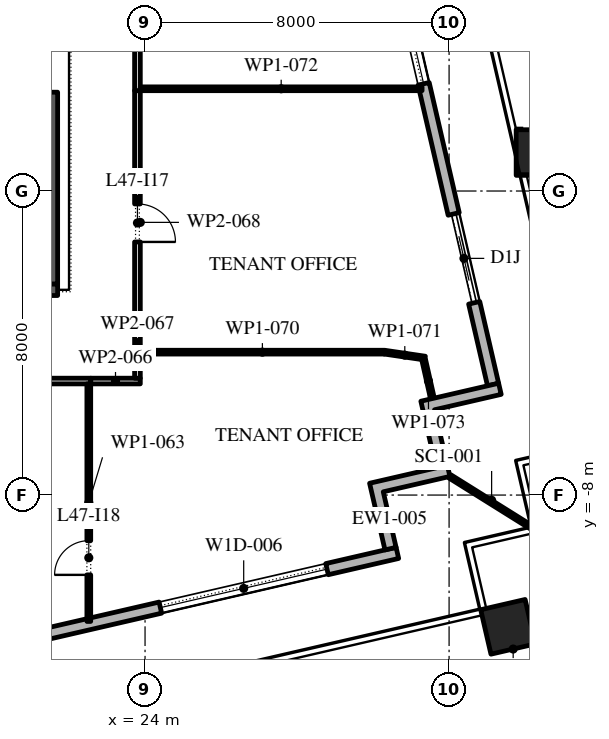
"""IFC4 building model, lengths in metres.
Left out: names, types, materials, properties, quantities, classifications, styles, units other than length and angle.
Written with IfcOpenShell. Run it as: python <this file> out.ifc"""

import sys

from ifc_helpers import new_model, si_unit, direction, frame, frame_2d, origin, origin_2d, place, context, subcontext, project, spatial, polyline, rectangle, outline, extrude, element, fill, save


model = new_model("IFC4")
c1 = context("Model", 3, precision=1e-05, world=origin(), true_north=direction((0.0, 1.0)))
c2 = subcontext(c1, "Body", "Model", "MODEL_VIEW")
j1 = project(units=[si_unit("LENGTHUNIT", "METRE"), si_unit("PLANEANGLEUNIT", "RADIAN")], contexts=[c1])
p1 = place(None, origin())
s1 = spatial("IfcSite", under=j1, at=p1, CompositionType="ELEMENT")
p2 = place(p1, origin())
s2 = spatial("IfcBuilding", under=s1, at=p2, CompositionType="ELEMENT")
p3 = place(p2, frame((0.0, 0.0, 213.6)))
s3 = spatial("IfcBuildingStorey", under=s2, at=p3, CompositionType="ELEMENT", Elevation=213.6)
p4 = place(p3, frame((33.551, -11.467, 0.0), z_axis=(0.0, 0.0, 1.0), x_axis=(0.974370064785, 0.224951054344, 0.0)))
e1 = element("IfcColumn", 1, at=p4, inside=s3, PredefinedType="COLUMN", context=c2, shape_type="SweptSolid", body=[
    extrude(rectangle(XDim=1.2, YDim=1.2, at=origin_2d()), origin(), (0.0, 0.0, 1.0), 4.2),
])
p5 = place(p3, frame((34.365, 1.012, 0.0), z_axis=(-0.002731884952, 0.01168316756, 0.999928017609), x_axis=(-0.973733900744, -0.227689021567, 0.0)))
e2 = element("IfcColumn", 2, at=p5, inside=s3, PredefinedType="COLUMN", context=c2, shape_type="SweptSolid", body=[
    extrude(rectangle(XDim=1.2, YDim=1.2, at=origin_2d()), origin(), (0.0, 0.0, 1.0), 4.2),
])
p6 = place(p3, frame((-17.592, -20.657, 0.0), z_axis=(0.0, 0.0, 1.0), x_axis=(0.974370243697, 0.224950279389, 0.0)))
e3 = element("IfcWall", 3, at=p6, inside=s3, PredefinedType="STANDARD", context=c2, shape_type="SweptSolid", body=[
    extrude(rectangle(XDim=49.5, YDim=0.3, at=frame_2d((24.75, 0.0))), origin(), (0.0, 0.0, 1.0), 4.0),
])
p7 = place(p6, frame((2.8, 0.0, 0.0)))
e4 = element("IfcOpeningElement", 4, at=p7, cuts=e3, PredefinedType="OPENING", context=c2, shape_type="SweptSolid", body=[
    extrude(rectangle(XDim=2.4, YDim=3.5, at=frame_2d((1.2, 1.75))), frame((0.0, 0.16, 0.0), z_axis=(0.0, -1.0, 0.0), x_axis=(1.0, 0.0, 0.0)), (0.0, 0.0, 1.0), 0.32),
])
p8 = place(p6, frame((9.9, 0.0, 0.45)))
e5 = element("IfcOpeningElement", 5, at=p8, cuts=e3, PredefinedType="OPENING", context=c2, shape_type="SweptSolid", body=[
    extrude(rectangle(XDim=4.5, YDim=2.575, at=frame_2d((2.25, 1.288))), frame((0.0, 0.16, 0.0), z_axis=(0.0, -1.0, 0.0), x_axis=(1.0, 0.0, 0.0)), (0.0, 0.0, 1.0), 0.32),
])
p9 = place(p6, frame((18.2, 0.0, 0.45)))
e6 = element("IfcOpeningElement", 6, at=p9, cuts=e3, PredefinedType="OPENING", context=c2, shape_type="SweptSolid", body=[
    extrude(rectangle(XDim=4.5, YDim=2.675, at=frame_2d((2.25, 1.337))), frame((0.0, 0.16, 0.0), z_axis=(0.0, -1.0, 0.0), x_axis=(1.0, 0.0, 0.0)), (0.0, 0.0, 1.0), 0.32),
])
p10 = place(p6, frame((26.5, 0.0, 0.45)))
e7 = element("IfcOpeningElement", 7, at=p10, cuts=e3, PredefinedType="OPENING", context=c2, shape_type="SweptSolid", body=[
    extrude(rectangle(XDim=4.5, YDim=2.75, at=frame_2d((2.25, 1.375))), frame((0.0, 0.16, 0.0), z_axis=(0.0, -1.0, 0.0), x_axis=(1.0, 0.0, 0.0)), (0.0, 0.0, 1.0), 0.32),
])
p11 = place(p6, frame((36.8, 0.0, 0.0)))
e8 = element("IfcOpeningElement", 8, at=p11, cuts=e3, PredefinedType="OPENING", context=c2, shape_type="SweptSolid", body=[
    extrude(rectangle(XDim=2.4, YDim=3.275, at=frame_2d((1.2, 1.637))), frame((0.0, 0.16, 0.0), z_axis=(0.0, -1.0, 0.0), x_axis=(1.0, 0.0, 0.0)), (0.0, 0.0, 1.0), 0.32),
])
p12 = place(p6, frame((43.1, 0.0, 0.45)))
e9 = element("IfcOpeningElement", 9, at=p12, cuts=e3, PredefinedType="OPENING", context=c2, shape_type="SweptSolid", body=[
    extrude(rectangle(XDim=4.5, YDim=2.875, at=frame_2d((2.25, 1.438))), frame((0.0, 0.16, 0.0), z_axis=(0.0, -1.0, 0.0), x_axis=(1.0, 0.0, 0.0)), (0.0, 0.0, 1.0), 0.32),
])
p13 = place(p3, frame((33.157, -5.092, 0.0), z_axis=(0.0, 0.0, 1.0), x_axis=(-0.224950279389, 0.974370243697, 0.0)))
e10 = element("IfcWall", 10, at=p13, inside=s3, PredefinedType="STANDARD", context=c2, shape_type="SweptSolid", body=[
    extrude(rectangle(XDim=49.5, YDim=0.3, at=frame_2d((24.75, 0.0))), origin(), (0.0, 0.0, 1.0), 4.0),
])
p14 = place(p13, frame((2.207, 0.0, 0.0)))
e11 = element("IfcOpeningElement", 11, at=p14, cuts=e10, PredefinedType="OPENING", context=c2, shape_type="SweptSolid", body=[
    extrude(rectangle(XDim=2.4, YDim=3.125, at=frame_2d((1.2, 1.562))), frame((0.0, 0.16, 0.0), z_axis=(0.0, -1.0, 0.0), x_axis=(1.0, 0.0, 0.0)), (0.0, 0.0, 1.0), 0.32),
])
p15 = place(p13, frame((8.121, 0.0, 0.45)))
e12 = element("IfcOpeningElement", 12, at=p15, cuts=e10, PredefinedType="OPENING", context=c2, shape_type="SweptSolid", body=[
    extrude(rectangle(XDim=4.5, YDim=2.875, at=frame_2d((2.25, 1.438))), frame((0.0, 0.16, 0.0), z_axis=(0.0, -1.0, 0.0), x_axis=(1.0, 0.0, 0.0)), (0.0, 0.0, 1.0), 0.32),
])
p16 = place(p13, frame((15.236, 0.0, 0.45)))
e13 = element("IfcOpeningElement", 13, at=p16, cuts=e10, PredefinedType="OPENING", context=c2, shape_type="SweptSolid", body=[
    extrude(rectangle(XDim=4.5, YDim=2.875, at=frame_2d((2.25, 1.438))), frame((0.0, 0.16, 0.0), z_axis=(0.0, -1.0, 0.0), x_axis=(1.0, 0.0, 0.0)), (0.0, 0.0, 1.0), 0.32),
])
p17 = place(p13, frame((22.35, 0.0, 0.45)))
e14 = element("IfcOpeningElement", 14, at=p17, cuts=e10, PredefinedType="OPENING", context=c2, shape_type="SweptSolid", body=[
    extrude(rectangle(XDim=4.5, YDim=3.0, at=frame_2d((2.25, 1.5))), frame((0.0, 0.16, 0.0), z_axis=(0.0, -1.0, 0.0), x_axis=(1.0, 0.0, 0.0)), (0.0, 0.0, 1.0), 0.32),
])
p18 = place(p13, frame((30.514, 0.0, 0.0)))
e15 = element("IfcOpeningElement", 15, at=p18, cuts=e10, PredefinedType="OPENING", context=c2, shape_type="SweptSolid", body=[
    extrude(rectangle(XDim=2.4, YDim=3.45, at=frame_2d((1.2, 1.725))), frame((0.0, 0.16, 0.0), z_axis=(0.0, -1.0, 0.0), x_axis=(1.0, 0.0, 0.0)), (0.0, 0.0, 1.0), 0.32),
])
p19 = place(p13, frame((36.579, 0.0, 0.45)))
e16 = element("IfcOpeningElement", 16, at=p19, cuts=e10, PredefinedType="OPENING", context=c2, shape_type="SweptSolid", body=[
    extrude(rectangle(XDim=4.5, YDim=3.05, at=frame_2d((2.25, 1.525))), frame((0.0, 0.16, 0.0), z_axis=(0.0, -1.0, 0.0), x_axis=(1.0, 0.0, 0.0)), (0.0, 0.0, 1.0), 0.32),
])
p20 = place(p13, frame((43.693, 0.0, 0.45)))
e17 = element("IfcOpeningElement", 17, at=p20, cuts=e10, PredefinedType="OPENING", context=c2, shape_type="SweptSolid", body=[
    extrude(rectangle(XDim=4.5, YDim=3.05, at=frame_2d((2.25, 1.525))), frame((0.0, 0.16, 0.0), z_axis=(0.0, -1.0, 0.0), x_axis=(1.0, 0.0, 0.0)), (0.0, 0.0, 1.0), 0.32),
])
p21 = place(p3, origin())
e18 = element("IfcWall", 18, at=p21, inside=s3, PredefinedType="STANDARD", context=c2, shape_type="SweptSolid", body=[
    extrude(outline(polyline([(31.662, -7.285), (31.257, -5.531), (33.303, -5.058), (33.371, -5.351), (31.617, -5.756), (32.022, -7.51), (30.268, -7.914), (30.605, -9.376), (30.313, -9.443), (29.908, -7.69), (31.662, -7.285)])), origin(), (0.0, 0.0, 1.0), 4.0),
])
p22 = place(p3, frame((32.022, -7.51, -0.05), z_axis=(0.0, 0.0, 1.0), x_axis=(0.848047176257, -0.529920736377, 0.0)))
e19 = element("IfcWall", 19, at=p22, inside=s3, PredefinedType="STANDARD", context=c2, shape_type="SweptSolid", body=[
    extrude(rectangle(XDim=2.526, YDim=0.1, at=frame_2d((1.263, 0.0))), origin(), (0.0, 0.0, 1.0), 4.05),
])
p23 = place(p3, frame((21.35, -2.45, 0.0), z_axis=(0.0, 0.0, 1.0), x_axis=(0.0, 1.0, 0.0)))
e20 = element("IfcWall", 20, at=p23, inside=s3, PredefinedType="SHEAR", context=c2, shape_type="SweptSolid", body=[
    extrude(rectangle(XDim=27.9, YDim=0.7, at=frame_2d((13.95, 0.0))), origin(), (0.0, 0.0, 1.0), 4.0),
])
p24 = place(p23, frame((5.05, 0.0, 0.0)))
e21 = element("IfcOpeningElement", 21, at=p24, cuts=e20, PredefinedType="OPENING", context=c2, shape_type="SweptSolid", body=[
    extrude(rectangle(XDim=1.2, YDim=2.1, at=frame_2d((0.6, 1.05))), frame((0.0, 0.36, 0.0), z_axis=(0.0, -1.0, 0.0), x_axis=(1.0, 0.0, 0.0)), (0.0, 0.0, 1.0), 0.72),
])
p25 = place(p23, frame((21.65, 0.0, 0.0)))
e22 = element("IfcOpeningElement", 22, at=p25, cuts=e20, PredefinedType="OPENING", context=c2, shape_type="SweptSolid", body=[
    extrude(rectangle(XDim=1.2, YDim=2.1, at=frame_2d((0.6, 1.05))), frame((0.0, 0.36, 0.0), z_axis=(0.0, -1.0, 0.0), x_axis=(1.0, 0.0, 0.0)), (0.0, 0.0, 1.0), 0.72),
])
p26 = place(p3, frame((10.3, -2.6, 0.0), z_axis=(0.0, 0.0, 1.0), x_axis=(1.0, 0.0, 0.0)))
e23 = element("IfcWall", 23, at=p26, inside=s3, PredefinedType="SHEAR", context=c2, shape_type="SweptSolid", body=[
    extrude(rectangle(XDim=11.4, YDim=0.3, at=frame_2d((5.7, 0.0))), origin(), (0.0, 0.0, 1.0), 4.0),
])
p27 = place(p3, frame((22.57, -5.0, 0.0), z_axis=(0.0, 0.0, 1.0), x_axis=(-1.0, 0.0, 0.0)))
e24 = element("IfcWall", 24, at=p27, inside=s3, PredefinedType="PARTITIONING", context=c2, shape_type="SweptSolid", body=[
    extrude(rectangle(XDim=4.65, YDim=0.15, at=frame_2d((2.325, 0.0))), origin(), (0.0, 0.0, 1.0), 4.0),
])
p28 = place(p27, frame((1.5, 0.0, 0.0)))
e25 = element("IfcOpeningElement", 25, at=p28, cuts=e24, PredefinedType="OPENING", context=c2, shape_type="SweptSolid", body=[
    extrude(rectangle(XDim=1.0, YDim=2.1, at=frame_2d((0.5, 1.05))), frame((0.0, 0.085, 0.0), z_axis=(0.0, -1.0, 0.0), x_axis=(1.0, 0.0, 0.0)), (0.0, 0.0, 1.0), 0.17),
])
p29 = place(p3, frame((22.52, -5.075, 0.0), z_axis=(0.0, 0.0, 1.0), x_axis=(0.0, -1.0, 0.0)))
e26 = element("IfcWall", 26, at=p29, inside=s3, PredefinedType="PARTITIONING", context=c2, shape_type="SweptSolid", body=[
    extrude(rectangle(XDim=6.25, YDim=0.1, at=frame_2d((3.125, 0.0))), origin(), (0.0, 0.0, 1.0), 4.0),
])
p30 = place(p29, frame((4.125, 0.0, 0.0)))
e27 = element("IfcOpeningElement", 27, at=p30, cuts=e26, PredefinedType="OPENING", context=c2, shape_type="SweptSolid", body=[
    extrude(rectangle(XDim=0.9, YDim=2.1, at=frame_2d((0.45, 1.05))), frame((0.0, 0.06, 0.0), z_axis=(0.0, -1.0, 0.0), x_axis=(1.0, 0.0, 0.0)), (0.0, 0.0, 1.0), 0.12),
])
p31 = place(p3, frame((23.875, -5.0, 0.0), z_axis=(0.0, 0.0, 1.0), x_axis=(-1.0, 0.0, 0.0)))
e28 = element("IfcWall", 28, at=p31, inside=s3, PredefinedType="PARTITIONING", context=c2, shape_type="SweptSolid", body=[
    extrude(rectangle(XDim=1.305, YDim=0.15, at=frame_2d((0.652, 0.0))), origin(), (0.0, 0.0, 1.0), 4.0),
])
p32 = place(p3, frame((23.8, -4.29, 0.0), z_axis=(0.0, 0.0, 1.0), x_axis=(0.0, -1.0, 0.0)))
e29 = element("IfcWall", 29, at=p32, inside=s3, PredefinedType="PARTITIONING", context=c2, shape_type="SweptSolid", body=[
    extrude(rectangle(XDim=0.635, YDim=0.15, at=frame_2d((0.317, 0.0))), origin(), (0.0, 0.0, 1.0), 4.0),
])
p33 = place(p3, frame((23.8, 2.64, 0.0), z_axis=(0.0, 0.0, 1.0), x_axis=(0.0, -1.0, 0.0)))
e30 = element("IfcWall", 30, at=p33, inside=s3, PredefinedType="PARTITIONING", context=c2, shape_type="SweptSolid", body=[
    extrude(rectangle(XDim=6.93, YDim=0.15, at=frame_2d((3.465, 0.0))), origin(), (0.0, 0.0, 1.0), 4.0),
])
p34 = place(p33, frame((2.98, 0.0, 0.0)))
e31 = element("IfcOpeningElement", 31, at=p34, cuts=e30, PredefinedType="OPENING", context=c2, shape_type="SweptSolid", body=[
    extrude(rectangle(XDim=1.0, YDim=2.1, at=frame_2d((0.5, 1.05))), frame((0.0, 0.085, 0.0), z_axis=(0.0, -1.0, 0.0), x_axis=(1.0, 0.0, 0.0)), (0.0, 0.0, 1.0), 0.17),
])
p35 = place(p3, frame((23.8, 27.2, 0.0), z_axis=(0.0, 0.0, 1.0), x_axis=(0.0, -1.0, 0.0)))
e32 = element("IfcWall", 32, at=p35, inside=s3, PredefinedType="PARTITIONING", context=c2, shape_type="SweptSolid", body=[
    extrude(rectangle(XDim=24.56, YDim=0.15, at=frame_2d((12.28, 0.0))), origin(), (0.0, 0.0, 1.0), 4.0),
])
p36 = place(p35, frame((14.11, 0.0, 0.0)))
e33 = element("IfcOpeningElement", 33, at=p36, cuts=e32, PredefinedType="OPENING", context=c2, shape_type="SweptSolid", body=[
    extrude(rectangle(XDim=1.0, YDim=2.1, at=frame_2d((0.5, 1.05))), frame((0.0, 0.085, 0.0), z_axis=(0.0, -1.0, 0.0), x_axis=(1.0, 0.0, 0.0)), (0.0, 0.0, 1.0), 0.17),
])
p37 = place(p3, frame((30.3, -4.24, 0.0), z_axis=(0.0, 0.0, 1.0), x_axis=(-1.0, 0.0, 0.0)))
e34 = element("IfcWall", 34, at=p37, inside=s3, PredefinedType="PARTITIONING", context=c2, shape_type="SweptSolid", body=[
    extrude(rectangle(XDim=6.425, YDim=0.1, at=frame_2d((3.212, 0.0))), origin(), (0.0, 0.0, 1.0), 4.0),
])
p38 = place(p3, frame((31.369, -4.397, 0.0), z_axis=(0.0, 0.0, 1.0), x_axis=(-0.989385908309, 0.145311817963, 0.0)))
e35 = element("IfcWall", 35, at=p38, inside=s3, PredefinedType="PARTITIONING", context=c2, shape_type="SweptSolid", body=[
    extrude(rectangle(XDim=1.08, YDim=0.1, at=frame_2d((0.54, 0.0))), origin(), (0.0, 0.0, 1.0), 4.0),
])
p39 = place(p3, frame((31.289, 2.69, 0.0), z_axis=(0.0, 0.0, 1.0), x_axis=(-1.0, 0.0, 0.0)))
e36 = element("IfcWall", 36, at=p39, inside=s3, PredefinedType="PARTITIONING", context=c2, shape_type="SweptSolid", body=[
    extrude(rectangle(XDim=7.414, YDim=0.1, at=frame_2d((3.707, 0.0))), origin(), (0.0, 0.0, 1.0), 4.0),
])
p40 = place(p3, frame((31.584, -5.558, 0.0), z_axis=(0.0, 0.0, 1.0), x_axis=(-0.220443734992, 0.975399692281, 0.0)))
e37 = element("IfcWall", 37, at=p40, inside=s3, PredefinedType="PARTITIONING", context=c2, shape_type="SweptSolid", body=[
    extrude(rectangle(XDim=1.147, YDim=0.1, at=frame_2d((0.574, 0.0))), origin(), (0.0, 0.0, 1.0), 4.0),
])
p41 = place(p12, origin())
e38 = element("IfcWindow", 38, at=p41, inside=s3, PartitioningType="DOUBLE_PANEL_VERTICAL", PredefinedType="WINDOW", context=c2, shape_type="SweptSolid", body=[
    extrude(rectangle(XDim=4.5, YDim=2.875, at=frame_2d((2.25, 1.438))), frame((0.0, 0.03, 0.0), z_axis=(0.0, -1.0, 0.0), x_axis=(1.0, 0.0, 0.0)), (0.0, 0.0, 1.0), 0.06),
])
fill(e9, e38)
p42 = place(p14, origin())
e39 = element("IfcDoor", 39, at=p42, inside=s3, OperationType="DOUBLE_DOOR_SLIDING", PredefinedType="DOOR", context=c2, shape_type="SweptSolid", body=[
    extrude(rectangle(XDim=2.4, YDim=3.125, at=frame_2d((1.2, 1.562))), frame((0.0, 0.025, 0.0), z_axis=(0.0, -1.0, 0.0), x_axis=(1.0, 0.0, 0.0)), (0.0, 0.0, 1.0), 0.05),
])
fill(e11, e39)
p43 = place(p15, origin())
e40 = element("IfcWindow", 40, at=p43, inside=s3, PartitioningType="DOUBLE_PANEL_VERTICAL", PredefinedType="WINDOW", context=c2, shape_type="SweptSolid", body=[
    extrude(rectangle(XDim=4.5, YDim=2.875, at=frame_2d((2.25, 1.438))), frame((0.0, 0.03, 0.0), z_axis=(0.0, -1.0, 0.0), x_axis=(1.0, 0.0, 0.0)), (0.0, 0.0, 1.0), 0.06),
])
fill(e12, e40)
p44 = place(p34, origin())
e41 = element("IfcDoor", 41, at=p44, inside=s3, OperationType="SINGLE_SWING_LEFT", PredefinedType="DOOR", context=c2, shape_type="SweptSolid", body=[
    extrude(rectangle(XDim=1.0, YDim=2.1, at=frame_2d((0.5, 1.05))), frame((0.0, 0.025, 0.0), z_axis=(0.0, -1.0, 0.0), x_axis=(1.0, 0.0, 0.0)), (0.0, 0.0, 1.0), 0.05),
])
fill(e31, e41)
p45 = place(p30, frame((0.9, 0.0, 0.0), z_axis=(0.0, 0.0, 1.0), x_axis=(-1.0, 0.0, 0.0)))
e42 = element("IfcDoor", 42, at=p45, inside=s3, OperationType="SINGLE_SWING_RIGHT", PredefinedType="DOOR", context=c2, shape_type="SweptSolid", body=[
    extrude(rectangle(XDim=0.9, YDim=2.1, at=frame_2d((0.45, 1.05))), frame((0.0, 0.025, 0.0), z_axis=(0.0, -1.0, 0.0), x_axis=(1.0, 0.0, 0.0)), (0.0, 0.0, 1.0), 0.05),
])
fill(e27, e42)
save(model, sys.argv[1])
